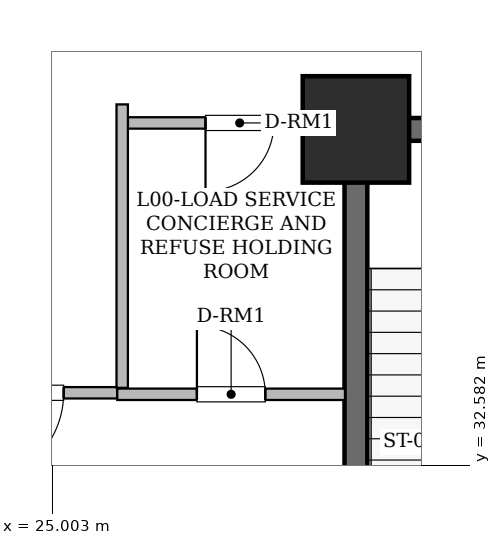
"""IFC4 building model, lengths in metres.
Left out: names, types, materials, properties, quantities, classifications, styles, units other than length and angle.
Written with IfcOpenShell. Run it as: python <this file> out.ifc"""

import sys

from ifc_helpers import new_model, si_unit, direction, frame, frame_2d, origin, origin_2d, place, context, subcontext, project, spatial, rectangle, hollow_rectangle, extrude, element, fill, save


model = new_model("IFC4")
c1 = context("Model", 3, precision=1e-05, world=origin(), true_north=direction((0.0, 1.0)))
c2 = subcontext(c1, "Body", "Model", "MODEL_VIEW")
j1 = project(units=[si_unit("LENGTHUNIT", "METRE"), si_unit("PLANEANGLEUNIT", "RADIAN")], contexts=[c1])
p1 = place(None, origin())
s1 = spatial("IfcSite", under=j1, at=p1, CompositionType="ELEMENT")
p2 = place(p1, origin())
s2 = spatial("IfcBuilding", under=s1, at=p2, CompositionType="ELEMENT")
p3 = place(p2, origin())
s3 = spatial("IfcBuildingStorey", under=s2, at=p3, CompositionType="ELEMENT", Elevation=0.0)
p4 = place(p3, frame((29.0, 37.0, 0.0), z_axis=(0.0, 0.0, 1.0), x_axis=(1.0, 0.0, 0.0)))
e1 = element("IfcColumn", 1, at=p4, inside=s3, PredefinedType="COLUMN", context=c2, shape_type="SweptSolid", body=[
    extrude(hollow_rectangle(XDim=1.4, YDim=1.4, WallThickness=0.07, at=origin_2d()), origin(), (0.0, 0.0, 1.0), 7.2),
])
p5 = place(p3, frame((29.0, 28.0, 0.0), z_axis=(0.0, 0.0, 1.0), x_axis=(0.0, 1.0, 0.0)))
e2 = element("IfcWall", 2, at=p5, inside=s3, PredefinedType="SHEAR", context=c2, shape_type="SweptSolid", body=[
    extrude(rectangle(XDim=9.0, YDim=0.3, at=frame_2d((4.5, 0.0))), origin(), (0.0, 0.0, 1.0), 6.78),
])
p6 = place(p3, frame((29.0, 37.0, 0.0), z_axis=(0.0, 0.0, 1.0), x_axis=(1.0, 0.0, 0.0)))
e3 = element("IfcWall", 3, at=p6, inside=s3, PredefinedType="SHEAR", context=c2, shape_type="SweptSolid", body=[
    extrude(rectangle(XDim=10.4, YDim=0.3, at=frame_2d((5.2, 0.0))), origin(), (0.0, 0.0, 1.0), 6.78),
])
p7 = place(p6, frame((5.14, 0.0, 0.0)))
e4 = element("IfcOpeningElement", 4, at=p7, cuts=e3, PredefinedType="OPENING", context=c2, shape_type="SweptSolid", body=[
    extrude(rectangle(XDim=1.15, YDim=2.2, at=frame_2d((0.575, 1.1))), frame((0.0, 0.16, 0.0), z_axis=(0.0, -1.0, 0.0), x_axis=(1.0, 0.0, 0.0)), (0.0, 0.0, 1.0), 0.32),
])
p8 = place(p3, frame((25.86, 33.535, 0.0), z_axis=(0.0, 0.0, 1.0), x_axis=(-1.0, 0.0, 0.0)))
e5 = element("IfcWall", 5, at=p8, inside=s3, PredefinedType="STANDARD", context=c2, shape_type="SweptSolid", body=[
    extrude(rectangle(XDim=2.61, YDim=0.15, at=frame_2d((1.305, 0.0))), origin(), (0.0, 0.0, 1.0), 6.78),
])
p9 = place(p8, frame((0.705, 0.0, 0.0)))
e6 = element("IfcOpeningElement", 6, at=p9, cuts=e5, PredefinedType="OPENING", context=c2, shape_type="SweptSolid", body=[
    extrude(rectangle(XDim=1.2, YDim=2.15, at=frame_2d((0.6, 1.075))), frame((0.0, 0.085, 0.0), z_axis=(0.0, -1.0, 0.0), x_axis=(1.0, 0.0, 0.0)), (0.0, 0.0, 1.0), 0.17),
])
p10 = place(p3, frame((28.943, 37.085, 0.0), z_axis=(0.0, 0.0, 1.0), x_axis=(-1.0, 0.0, 0.0)))
e7 = element("IfcWall", 7, at=p10, inside=s3, PredefinedType="STANDARD", context=c2, shape_type="SweptSolid", body=[
    extrude(rectangle(XDim=2.943, YDim=0.15, at=frame_2d((1.472, 0.0))), origin(), (0.0, 0.0, 1.0), 6.237),
])
p11 = place(p10, frame((1.022, 0.0, 0.0)))
e8 = element("IfcOpeningElement", 8, at=p11, cuts=e7, PredefinedType="OPENING", context=c2, shape_type="SweptSolid", body=[
    extrude(rectangle(XDim=0.9, YDim=2.1, at=frame_2d((0.45, 1.05))), frame((0.0, 0.085, 0.0), z_axis=(0.0, -1.0, 0.0), x_axis=(1.0, 0.0, 0.0)), (0.0, 0.0, 1.0), 0.17),
])
p12 = place(p3, frame((25.925, 37.329, 0.0), z_axis=(0.0, 0.0, 1.0), x_axis=(0.0, -1.0, 0.0)))
e9 = element("IfcWall", 9, at=p12, inside=s3, PredefinedType="STANDARD", context=c2, shape_type="SweptSolid", body=[
    extrude(rectangle(XDim=3.729, YDim=0.15, at=frame_2d((1.865, 0.0))), origin(), (0.0, 0.0, 1.0), 6.78),
])
p13 = place(p3, frame((25.86, 33.515, 0.0), z_axis=(0.0, 0.0, 1.0), x_axis=(1.0, 0.0, 0.0)))
e10 = element("IfcWall", 10, at=p13, inside=s3, PredefinedType="STANDARD", context=c2, shape_type="SweptSolid", body=[
    extrude(rectangle(XDim=2.996, YDim=0.15, at=frame_2d((1.498, 0.0))), origin(), (0.0, 0.0, 1.0), 6.237),
])
p14 = place(p13, frame((1.048, 0.0, 0.0)))
e11 = element("IfcOpeningElement", 11, at=p14, cuts=e10, PredefinedType="OPENING", context=c2, shape_type="SweptSolid", body=[
    extrude(rectangle(XDim=0.9, YDim=2.1, at=frame_2d((0.45, 1.05))), frame((0.0, 0.085, 0.0), z_axis=(0.0, -1.0, 0.0), x_axis=(1.0, 0.0, 0.0)), (0.0, 0.0, 1.0), 0.17),
])
p15 = place(p9, origin())
e12 = element("IfcDoor", 12, at=p15, inside=s3, OperationType="SINGLE_SWING_RIGHT", PredefinedType="DOOR", context=c2, shape_type="SweptSolid", body=[
    extrude(rectangle(XDim=1.2, YDim=2.15, at=frame_2d((0.6, 1.075))), frame((0.0, 0.025, 0.0), z_axis=(0.0, -1.0, 0.0), x_axis=(1.0, 0.0, 0.0)), (0.0, 0.0, 1.0), 0.05),
])
fill(e6, e12)
p16 = place(p11, origin())
e13 = element("IfcDoor", 13, at=p16, inside=s3, OperationType="SINGLE_SWING_RIGHT", PredefinedType="DOOR", context=c2, shape_type="SweptSolid", body=[
    extrude(rectangle(XDim=0.9, YDim=2.1, at=frame_2d((0.45, 1.05))), frame((0.0, 0.025, 0.0), z_axis=(0.0, -1.0, 0.0), x_axis=(1.0, 0.0, 0.0)), (0.0, 0.0, 1.0), 0.05),
])
fill(e8, e13)
p17 = place(p14, origin())
e14 = element("IfcDoor", 14, at=p17, inside=s3, OperationType="SINGLE_SWING_LEFT", PredefinedType="DOOR", context=c2, shape_type="SweptSolid", body=[
    extrude(rectangle(XDim=0.9, YDim=2.1, at=frame_2d((0.45, 1.05))), frame((0.0, 0.025, 0.0), z_axis=(0.0, -1.0, 0.0), x_axis=(1.0, 0.0, 0.0)), (0.0, 0.0, 1.0), 0.05),
])
fill(e11, e14)
save(model, sys.argv[1])
